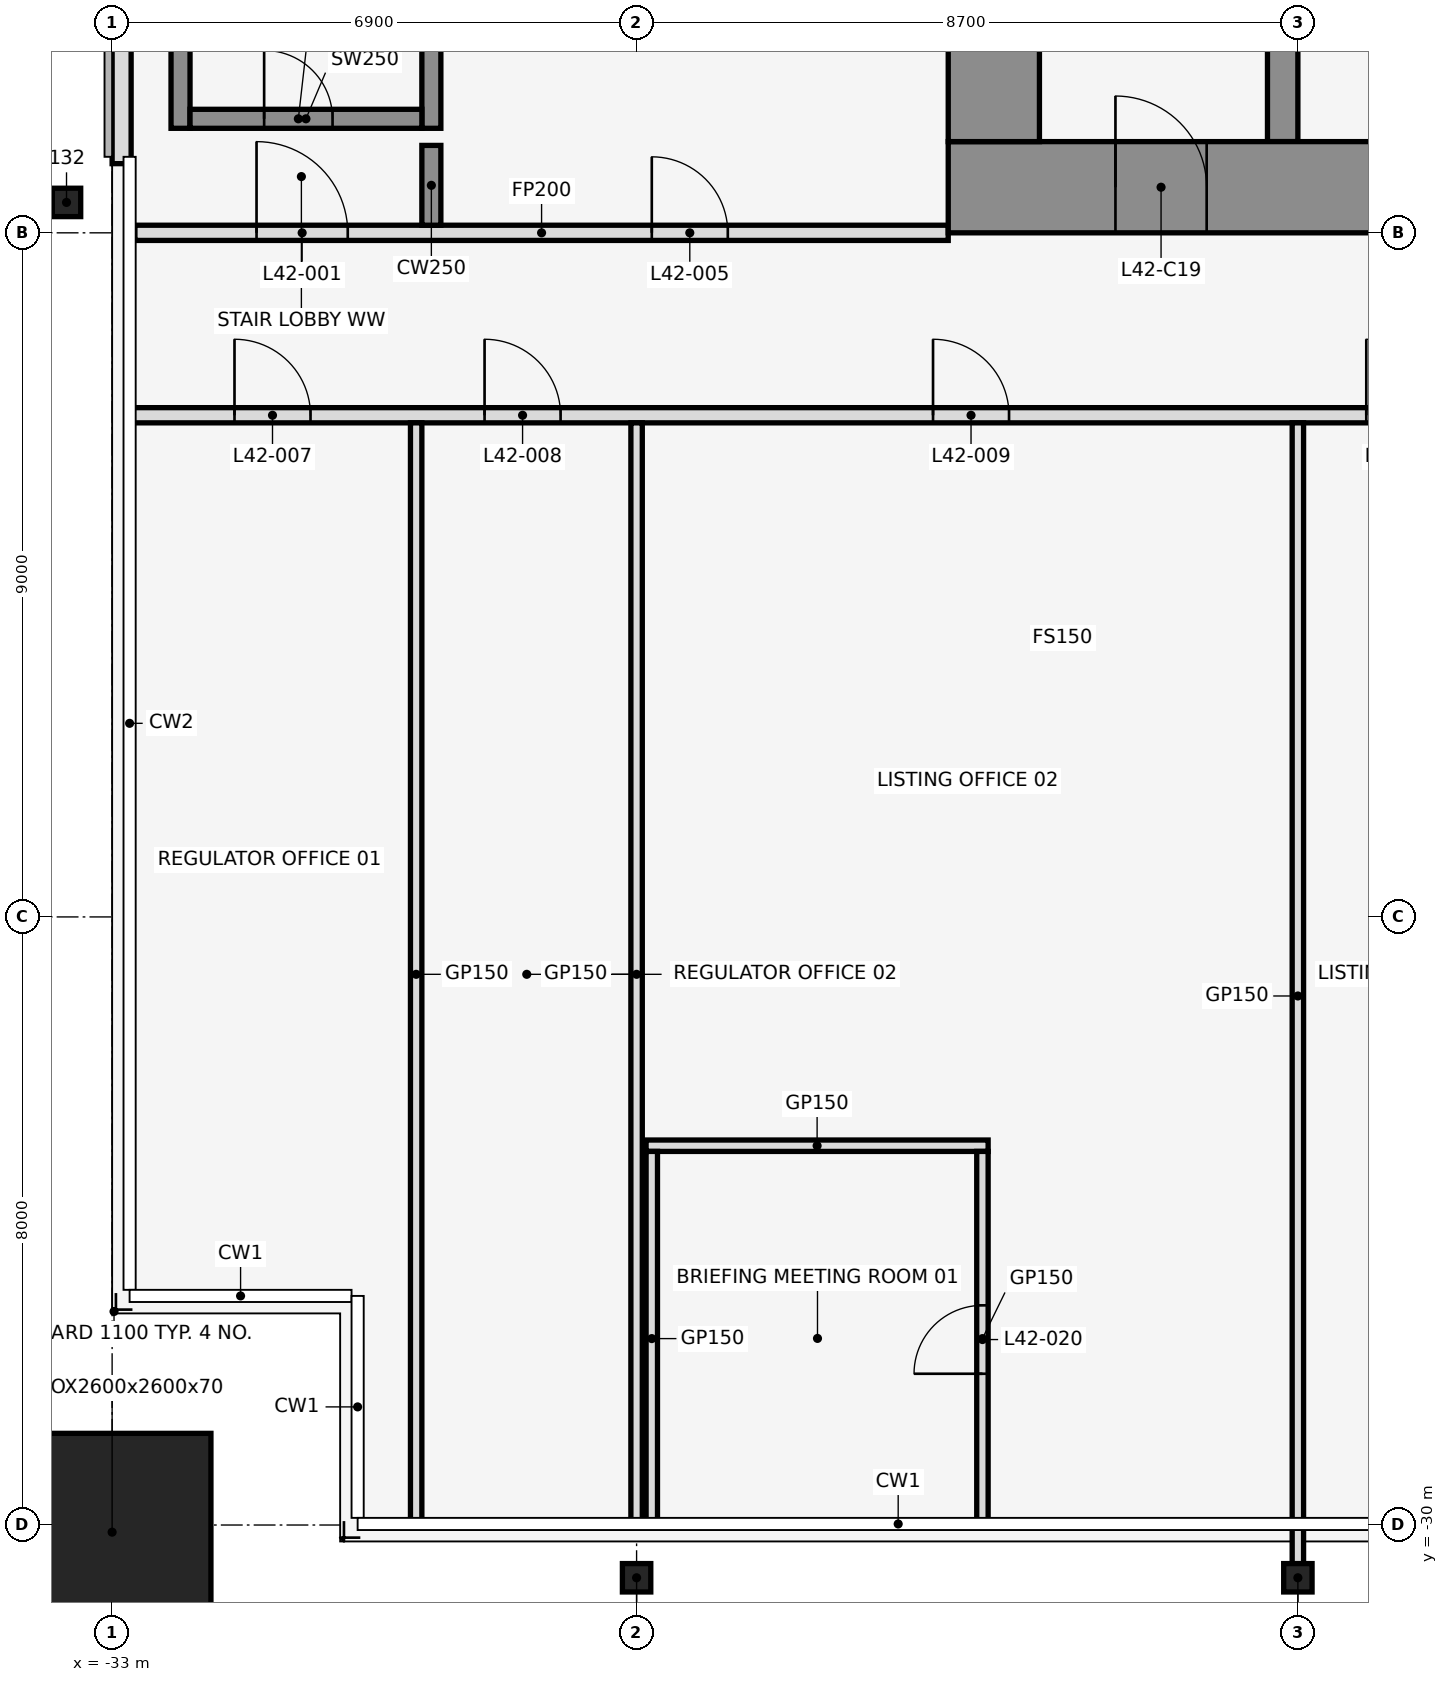
"""IFC4 building model, lengths in metres.
Left out: names, types, materials, properties, quantities, classifications, styles, units other than length and angle.
Written with IfcOpenShell. Run it as: python <this file> out.ifc"""

import sys

from ifc_helpers import new_model, si_unit, direction, frame, frame_2d, origin, origin_2d, place, context, subcontext, project, spatial, rectangle, hollow_rectangle, i_section, extrude, element, fill, save


model = new_model("IFC4")
c1 = context("Model", 3, precision=1e-05, world=origin(), true_north=direction((0.0, 1.0)))
c2 = subcontext(c1, "Body", "Model", "MODEL_VIEW")
j1 = project(units=[si_unit("LENGTHUNIT", "METRE"), si_unit("PLANEANGLEUNIT", "RADIAN")], contexts=[c1])
p1 = place(None, origin())
s1 = spatial("IfcSite", under=j1, at=p1, CompositionType="ELEMENT")
p2 = place(p1, origin())
s2 = spatial("IfcBuilding", under=s1, at=p2, CompositionType="ELEMENT")
p3 = place(p2, frame((0.0, 0.0, 190.9)))
s3 = spatial("IfcBuildingStorey", under=s2, at=p3, CompositionType="ELEMENT", Elevation=190.9)
p4 = place(p3, frame((-33.0, -30.094, 0.0), z_axis=(0.0, 0.0, 1.0), x_axis=(1.0, 0.0, 0.0)))
e1 = element("IfcColumn", 1, at=p4, inside=s3, PredefinedType="COLUMN", context=c2, shape_type="SweptSolid", body=[
    extrude(hollow_rectangle(XDim=2.6, YDim=2.6, WallThickness=0.07, at=origin_2d()), origin(), (0.0, 0.0, 1.0), 4.1),
])
for number, where, z_axis, x_axis in (
    (2, (-26.1, -30.694, 0.0), (0.0, 0.0, 1.0), (1.0, 0.0, 0.0)),
    (3, (-17.4, -30.694, 0.0), (0.0, 0.0, 1.0), (1.0, 0.0, 0.0)),
    (4, (-33.6, -12.6, 0.0), (0.0, 0.0, 1.0), (1.0, 0.0, 0.0)),
):
    element("IfcColumn", number, at=place(p3, frame(where, z_axis=z_axis, x_axis=x_axis)), inside=s3, PredefinedType="COLUMN", context=c2, shape_type="SweptSolid", body=[
        extrude(i_section(OverallWidth=0.373, OverallDepth=0.373, WebThickness=0.016, FlangeThickness=0.026, at=origin_2d()), origin(), (0.0, 0.0, 1.0), 4.1),
    ])
p5 = place(p3, frame((-32.875, -6.0, 0.0), z_axis=(0.0, 0.0, 1.0), x_axis=(0.0, -1.0, 0.0)))
e5 = element("IfcWall", 5, at=p5, inside=s3, PredefinedType="STANDARD", context=c2, shape_type="SweptSolid", body=[
    extrude(rectangle(XDim=6.09, YDim=0.25, at=frame_2d((3.045, 0.0))), origin(), (0.0, 0.0, 1.0), 3.95),
])
p6 = place(p3, frame((-32.1, -11.625, 0.0), z_axis=(0.0, 0.0, 1.0), x_axis=(0.0, 1.0, 0.0)))
e6 = element("IfcWall", 6, at=p6, inside=s3, PredefinedType="SHEAR", context=c2, shape_type="SweptSolid", body=[
    extrude(rectangle(XDim=7.325, YDim=0.25, at=frame_2d((3.663, 0.0))), origin(), (0.0, 0.0, 1.0), 4.1),
])
p7 = place(p3, frame((-28.8, -11.625, 0.0), z_axis=(0.0, 0.0, 1.0), x_axis=(0.0, 1.0, 0.0)))
e7 = element("IfcWall", 7, at=p7, inside=s3, PredefinedType="SHEAR", context=c2, shape_type="SweptSolid", body=[
    extrude(rectangle(XDim=7.25, YDim=0.25, at=frame_2d((3.625, 0.0))), origin(), (0.0, 0.0, 1.0), 4.1),
])
p8 = place(p3, frame((-31.975, -11.5, 0.0), z_axis=(0.0, 0.0, 1.0), x_axis=(1.0, 0.0, 0.0)))
e8 = element("IfcWall", 8, at=p8, inside=s3, PredefinedType="SHEAR", context=c2, shape_type="SweptSolid", body=[
    extrude(rectangle(XDim=3.05, YDim=0.25, at=frame_2d((1.525, 0.0))), origin(), (0.0, 0.0, 1.0), 4.1),
])
p9 = place(p8, frame((0.975, 0.0, 0.0)))
e9 = element("IfcOpeningElement", 9, at=p9, cuts=e8, PredefinedType="OPENING", context=c2, shape_type="SweptSolid", body=[
    extrude(rectangle(XDim=0.9, YDim=2.1, at=frame_2d((0.45, 1.05))), frame((0.0, 0.137, 0.0), z_axis=(0.0, -1.0, 0.0), x_axis=(1.0, 0.0, 0.0)), (0.0, 0.0, 1.0), 0.274),
])
p10 = place(p3, frame((-25.975, -25.01, 0.0), z_axis=(0.0, 0.0, 1.0), x_axis=(1.0, 0.0, 0.0)))
e10 = element("IfcWall", 10, at=p10, inside=s3, PredefinedType="PARTITIONING", context=c2, shape_type="SweptSolid", body=[
    extrude(rectangle(XDim=4.5, YDim=0.15, at=frame_2d((2.25, 0.0))), origin(), (0.0, 0.0, 1.0), 2.96),
])
p11 = place(p3, frame((-32.79, -15.4, 0.0), z_axis=(0.0, 0.0, 1.0), x_axis=(1.0, 0.0, 0.0)))
e11 = element("IfcWall", 11, at=p11, inside=s3, PredefinedType="PARTITIONING", context=c2, shape_type="SweptSolid", body=[
    extrude(rectangle(XDim=65.58, YDim=0.2, at=frame_2d((32.79, 0.0))), origin(), (0.0, 0.0, 1.0), 2.96),
])
p12 = place(p11, frame((1.4, 0.0, 0.0)))
e12 = element("IfcOpeningElement", 12, at=p12, cuts=e11, PredefinedType="OPENING", context=c2, shape_type="SweptSolid", body=[
    extrude(rectangle(XDim=1.0, YDim=2.1, at=frame_2d((0.5, 1.05))), frame((0.0, 0.112, 0.0), z_axis=(0.0, -1.0, 0.0), x_axis=(1.0, 0.0, 0.0)), (0.0, 0.0, 1.0), 0.224),
])
p13 = place(p11, frame((4.69, 0.0, 0.0)))
e13 = element("IfcOpeningElement", 13, at=p13, cuts=e11, PredefinedType="OPENING", context=c2, shape_type="SweptSolid", body=[
    extrude(rectangle(XDim=1.0, YDim=2.1, at=frame_2d((0.5, 1.05))), frame((0.0, 0.112, 0.0), z_axis=(0.0, -1.0, 0.0), x_axis=(1.0, 0.0, 0.0)), (0.0, 0.0, 1.0), 0.224),
])
p14 = place(p11, frame((10.59, 0.0, 0.0)))
e14 = element("IfcOpeningElement", 14, at=p14, cuts=e11, PredefinedType="OPENING", context=c2, shape_type="SweptSolid", body=[
    extrude(rectangle(XDim=1.0, YDim=2.1, at=frame_2d((0.5, 1.05))), frame((0.0, 0.112, 0.0), z_axis=(0.0, -1.0, 0.0), x_axis=(1.0, 0.0, 0.0)), (0.0, 0.0, 1.0), 0.224),
])
p15 = place(p11, frame((16.29, 0.0, 0.0)))
e15 = element("IfcOpeningElement", 15, at=p15, cuts=e11, PredefinedType="OPENING", context=c2, shape_type="SweptSolid", body=[
    extrude(rectangle(XDim=1.0, YDim=2.1, at=frame_2d((0.5, 1.05))), frame((0.0, 0.112, 0.0), z_axis=(0.0, -1.0, 0.0), x_axis=(1.0, 0.0, 0.0)), (0.0, 0.0, 1.0), 0.224),
])
p16 = place(p11, frame((23.19, 0.0, 0.0)))
e16 = element("IfcOpeningElement", 16, at=p16, cuts=e11, PredefinedType="OPENING", context=c2, shape_type="SweptSolid", body=[
    extrude(rectangle(XDim=1.8, YDim=2.1, at=frame_2d((0.9, 1.05))), frame((0.0, 0.112, 0.0), z_axis=(0.0, -1.0, 0.0), x_axis=(1.0, 0.0, 0.0)), (0.0, 0.0, 1.0), 0.224),
])
p17 = place(p11, frame((33.29, 0.0, 0.0)))
e17 = element("IfcOpeningElement", 17, at=p17, cuts=e11, PredefinedType="OPENING", context=c2, shape_type="SweptSolid", body=[
    extrude(rectangle(XDim=1.8, YDim=2.1, at=frame_2d((0.9, 1.05))), frame((0.0, 0.112, 0.0), z_axis=(0.0, -1.0, 0.0), x_axis=(1.0, 0.0, 0.0)), (0.0, 0.0, 1.0), 0.224),
])
p18 = place(p11, frame((40.99, 0.0, 0.0)))
e18 = element("IfcOpeningElement", 18, at=p18, cuts=e11, PredefinedType="OPENING", context=c2, shape_type="SweptSolid", body=[
    extrude(rectangle(XDim=1.0, YDim=2.1, at=frame_2d((0.5, 1.05))), frame((0.0, 0.112, 0.0), z_axis=(0.0, -1.0, 0.0), x_axis=(1.0, 0.0, 0.0)), (0.0, 0.0, 1.0), 0.224),
])
p19 = place(p11, frame((48.29, 0.0, 0.0)))
e19 = element("IfcOpeningElement", 19, at=p19, cuts=e11, PredefinedType="OPENING", context=c2, shape_type="SweptSolid", body=[
    extrude(rectangle(XDim=0.9, YDim=2.1, at=frame_2d((0.45, 1.05))), frame((0.0, 0.112, 0.0), z_axis=(0.0, -1.0, 0.0), x_axis=(1.0, 0.0, 0.0)), (0.0, 0.0, 1.0), 0.224),
])
p20 = place(p11, frame((55.09, 0.0, 0.0)))
e20 = element("IfcOpeningElement", 20, at=p20, cuts=e11, PredefinedType="OPENING", context=c2, shape_type="SweptSolid", body=[
    extrude(rectangle(XDim=1.8, YDim=2.1, at=frame_2d((0.9, 1.05))), frame((0.0, 0.112, 0.0), z_axis=(0.0, -1.0, 0.0), x_axis=(1.0, 0.0, 0.0)), (0.0, 0.0, 1.0), 0.224),
])
p21 = place(p11, frame((61.69, 0.0, 0.0)))
e21 = element("IfcOpeningElement", 21, at=p21, cuts=e11, PredefinedType="OPENING", context=c2, shape_type="SweptSolid", body=[
    extrude(rectangle(XDim=1.0, YDim=2.1, at=frame_2d((0.5, 1.05))), frame((0.0, 0.112, 0.0), z_axis=(0.0, -1.0, 0.0), x_axis=(1.0, 0.0, 0.0)), (0.0, 0.0, 1.0), 0.224),
])
p22 = place(p3, frame((-32.7, -13.0, 0.0), z_axis=(0.0, 0.0, 1.0), x_axis=(1.0, 0.0, 0.0)))
e22 = element("IfcWall", 22, at=p22, inside=s3, PredefinedType="PARTITIONING", context=c2, shape_type="SweptSolid", body=[
    extrude(rectangle(XDim=10.7, YDim=0.2, at=frame_2d((5.35, 0.0))), origin(), (0.0, 0.0, 1.0), 2.96),
])
p23 = place(p22, frame((1.6, 0.0, 0.0)))
e23 = element("IfcOpeningElement", 23, at=p23, cuts=e22, PredefinedType="OPENING", context=c2, shape_type="SweptSolid", body=[
    extrude(rectangle(XDim=1.2, YDim=2.1, at=frame_2d((0.6, 1.05))), frame((0.0, 0.112, 0.0), z_axis=(0.0, -1.0, 0.0), x_axis=(1.0, 0.0, 0.0)), (0.0, 0.0, 1.0), 0.224),
])
p24 = place(p22, frame((6.8, 0.0, 0.0)))
e24 = element("IfcOpeningElement", 24, at=p24, cuts=e22, PredefinedType="OPENING", context=c2, shape_type="SweptSolid", body=[
    extrude(rectangle(XDim=1.0, YDim=2.1, at=frame_2d((0.5, 1.05))), frame((0.0, 0.112, 0.0), z_axis=(0.0, -1.0, 0.0), x_axis=(1.0, 0.0, 0.0)), (0.0, 0.0, 1.0), 0.224),
])
p25 = place(p3, frame((-29.0, -30.01, 0.0), z_axis=(0.0, 0.0, 1.0), x_axis=(0.0, 1.0, 0.0)))
e25 = element("IfcWall", 25, at=p25, inside=s3, PredefinedType="PARTITIONING", context=c2, shape_type="SweptSolid", body=[
    extrude(rectangle(XDim=14.51, YDim=0.15, at=frame_2d((7.255, 0.0))), origin(), (0.0, 0.0, 1.0), 2.96),
])
p26 = place(p3, frame((-28.8, -12.9, 0.0), z_axis=(0.0, 0.0, 1.0), x_axis=(0.0, 1.0, 0.0)))
e26 = element("IfcWall", 26, at=p26, inside=s3, PredefinedType="SHEAR", context=c2, shape_type="SweptSolid", body=[
    extrude(rectangle(XDim=1.05, YDim=0.25, at=frame_2d((0.525, 0.0))), origin(), (0.0, 0.0, 1.0), 4.1),
])
p27 = place(p3, frame((-26.1, -30.01, 0.0), z_axis=(0.0, 0.0, 1.0), x_axis=(0.0, 1.0, 0.0)))
e27 = element("IfcWall", 27, at=p27, inside=s3, PredefinedType="PARTITIONING", context=c2, shape_type="SweptSolid", body=[
    extrude(rectangle(XDim=14.51, YDim=0.15, at=frame_2d((7.255, 0.0))), origin(), (0.0, 0.0, 1.0), 2.96),
])
p28 = place(p3, frame((-25.9, -30.01, 0.0), z_axis=(0.0, 0.0, 1.0), x_axis=(0.0, 1.0, 0.0)))
e28 = element("IfcWall", 28, at=p28, inside=s3, PredefinedType="PARTITIONING", context=c2, shape_type="SweptSolid", body=[
    extrude(rectangle(XDim=4.925, YDim=0.15, at=frame_2d((2.462, 0.0))), origin(), (0.0, 0.0, 1.0), 2.96),
])
p29 = place(p3, frame((-21.55, -30.01, 0.0), z_axis=(0.0, 0.0, 1.0), x_axis=(0.0, 1.0, 0.0)))
e29 = element("IfcWall", 29, at=p29, inside=s3, PredefinedType="PARTITIONING", context=c2, shape_type="SweptSolid", body=[
    extrude(rectangle(XDim=4.925, YDim=0.15, at=frame_2d((2.462, 0.0))), origin(), (0.0, 0.0, 1.0), 2.96),
])
p30 = place(p29, frame((2.0, 0.0, 0.0)))
e30 = element("IfcOpeningElement", 30, at=p30, cuts=e29, PredefinedType="OPENING", context=c2, shape_type="SweptSolid", body=[
    extrude(rectangle(XDim=0.9, YDim=2.1, at=frame_2d((0.45, 1.05))), frame((0.0, 0.087, 0.0), z_axis=(0.0, -1.0, 0.0), x_axis=(1.0, 0.0, 0.0)), (0.0, 0.0, 1.0), 0.174),
])
p31 = place(p3, frame((-17.4, -30.58, 0.0), z_axis=(0.0, 0.0, 1.0), x_axis=(0.0, 1.0, 0.0)))
e31 = element("IfcWall", 31, at=p31, inside=s3, PredefinedType="PARTITIONING", context=c2, shape_type="SweptSolid", body=[
    extrude(rectangle(XDim=15.08, YDim=0.15, at=frame_2d((7.54, 0.0))), origin(), (0.0, 0.0, 1.0), 2.96),
])
p32 = place(p3, frame((-17.6, -11.8, 0.0), z_axis=(0.0, 0.0, 1.0), x_axis=(0.0, 1.0, 0.0)))
e32 = element("IfcWall", 32, at=p32, inside=s3, PredefinedType="SHEAR", context=c2, shape_type="SweptSolid", body=[
    extrude(rectangle(XDim=10.6, YDim=0.4, at=frame_2d((5.3, 0.0))), origin(), (0.0, 0.0, 1.0), 4.1),
])
p33 = place(p32, frame((1.25, 0.0, 0.0)))
e33 = element("IfcOpeningElement", 33, at=p33, cuts=e32, PredefinedType="OPENING", context=c2, shape_type="SweptSolid", body=[
    extrude(rectangle(XDim=1.1, YDim=2.1, at=frame_2d((0.55, 1.05))), frame((0.0, 0.212, 0.0), z_axis=(0.0, -1.0, 0.0), x_axis=(1.0, 0.0, 0.0)), (0.0, 0.0, 1.0), 0.424),
])
p34 = place(p32, frame((3.95, 0.0, 0.0)))
e34 = element("IfcOpeningElement", 34, at=p34, cuts=e32, PredefinedType="OPENING", context=c2, shape_type="SweptSolid", body=[
    extrude(rectangle(XDim=1.1, YDim=2.1, at=frame_2d((0.55, 1.05))), frame((0.0, 0.212, 0.0), z_axis=(0.0, -1.0, 0.0), x_axis=(1.0, 0.0, 0.0)), (0.0, 0.0, 1.0), 0.424),
])
p35 = place(p3, frame((-22.0, -12.4, 0.0), z_axis=(0.0, 0.0, 1.0), x_axis=(1.0, 0.0, 0.0)))
e35 = element("IfcWall", 35, at=p35, inside=s3, PredefinedType="SHEAR", context=c2, shape_type="SweptSolid", body=[
    extrude(rectangle(XDim=44.0, YDim=1.2, at=frame_2d((22.0, 0.0))), origin(), (0.0, 0.0, 1.0), 4.1),
])
p36 = place(p35, frame((2.2, 0.0, 0.0)))
e36 = element("IfcOpeningElement", 36, at=p36, cuts=e35, PredefinedType="OPENING", context=c2, shape_type="SweptSolid", body=[
    extrude(rectangle(XDim=1.2, YDim=2.1, at=frame_2d((0.6, 1.05))), frame((0.0, 0.612, 0.0), z_axis=(0.0, -1.0, 0.0), x_axis=(1.0, 0.0, 0.0)), (0.0, 0.0, 1.0), 1.224),
])
p37 = place(p35, frame((21.4, 0.0, 0.0)))
e37 = element("IfcOpeningElement", 37, at=p37, cuts=e35, PredefinedType="OPENING", context=c2, shape_type="SweptSolid", body=[
    extrude(rectangle(XDim=1.2, YDim=2.1, at=frame_2d((0.6, 1.05))), frame((0.0, 0.612, 0.0), z_axis=(0.0, -1.0, 0.0), x_axis=(1.0, 0.0, 0.0)), (0.0, 0.0, 1.0), 1.224),
])
p38 = place(p35, frame((40.6, 0.0, 0.0)))
e38 = element("IfcOpeningElement", 38, at=p38, cuts=e35, PredefinedType="OPENING", context=c2, shape_type="SweptSolid", body=[
    extrude(rectangle(XDim=1.2, YDim=2.1, at=frame_2d((0.6, 1.05))), frame((0.0, 0.612, 0.0), z_axis=(0.0, -1.0, 0.0), x_axis=(1.0, 0.0, 0.0)), (0.0, 0.0, 1.0), 1.224),
])
p39 = place(p35, frame((16.0, 0.0, 0.0)))
e39 = element("IfcOpeningElement", 39, at=p39, cuts=e35, PredefinedType="OPENING", context=c2, shape_type="SweptSolid", body=[
    extrude(rectangle(XDim=1.8, YDim=2.1, at=frame_2d((0.9, 1.05))), frame((0.0, 0.612, 0.0), z_axis=(0.0, -1.0, 0.0), x_axis=(1.0, 0.0, 0.0)), (0.0, 0.0, 1.0), 1.224),
])
p40 = place(p35, frame((6.3, 0.0, 0.0)))
e40 = element("IfcOpeningElement", 40, at=p40, cuts=e35, PredefinedType="OPENING", context=c2, shape_type="SweptSolid", body=[
    extrude(rectangle(XDim=1.2, YDim=2.1, at=frame_2d((0.6, 1.05))), frame((0.0, 0.612, 0.0), z_axis=(0.0, -1.0, 0.0), x_axis=(1.0, 0.0, 0.0)), (0.0, 0.0, 1.0), 1.224),
])
p41 = place(p35, frame((26.2, 0.0, 0.0)))
e41 = element("IfcOpeningElement", 41, at=p41, cuts=e35, PredefinedType="OPENING", context=c2, shape_type="SweptSolid", body=[
    extrude(rectangle(XDim=1.8, YDim=2.1, at=frame_2d((0.9, 1.05))), frame((0.0, 0.612, 0.0), z_axis=(0.0, -1.0, 0.0), x_axis=(1.0, 0.0, 0.0)), (0.0, 0.0, 1.0), 1.224),
])
p42 = place(p35, frame((36.5, 0.0, 0.0)))
e42 = element("IfcOpeningElement", 42, at=p42, cuts=e35, PredefinedType="OPENING", context=c2, shape_type="SweptSolid", body=[
    extrude(rectangle(XDim=1.2, YDim=2.1, at=frame_2d((0.6, 1.05))), frame((0.0, 0.612, 0.0), z_axis=(0.0, -1.0, 0.0), x_axis=(1.0, 0.0, 0.0)), (0.0, 0.0, 1.0), 1.224),
])
p43 = place(p3, frame((-21.4, -11.8, 0.0), z_axis=(0.0, 0.0, 1.0), x_axis=(0.0, 1.0, 0.0)))
e43 = element("IfcWall", 43, at=p43, inside=s3, PredefinedType="SHEAR", context=c2, shape_type="SweptSolid", body=[
    extrude(rectangle(XDim=10.6, YDim=1.2, at=frame_2d((5.3, 0.0))), origin(), (0.0, 0.0, 1.0), 4.1),
])
p44 = place(p23, origin())
e44 = element("IfcDoor", 44, at=p44, inside=s3, OperationType="SINGLE_SWING_LEFT", PredefinedType="DOOR", context=c2, shape_type="SweptSolid", body=[
    extrude(rectangle(XDim=1.2, YDim=2.1, at=frame_2d((0.6, 1.05))), frame((0.0, 0.025, 0.0), z_axis=(0.0, -1.0, 0.0), x_axis=(1.0, 0.0, 0.0)), (0.0, 0.0, 1.0), 0.05),
])
fill(e23, e44)
p45 = place(p9, origin())
e45 = element("IfcDoor", 45, at=p45, inside=s3, OperationType="SINGLE_SWING_LEFT", PredefinedType="DOOR", context=c2, shape_type="SweptSolid", body=[
    extrude(rectangle(XDim=0.9, YDim=2.1, at=frame_2d((0.45, 1.05))), frame((0.0, 0.025, 0.0), z_axis=(0.0, -1.0, 0.0), x_axis=(1.0, 0.0, 0.0)), (0.0, 0.0, 1.0), 0.05),
])
fill(e9, e45)
p46 = place(p24, origin())
e46 = element("IfcDoor", 46, at=p46, inside=s3, OperationType="SINGLE_SWING_LEFT", PredefinedType="DOOR", context=c2, shape_type="SweptSolid", body=[
    extrude(rectangle(XDim=1.0, YDim=2.1, at=frame_2d((0.5, 1.05))), frame((0.0, 0.025, 0.0), z_axis=(0.0, -1.0, 0.0), x_axis=(1.0, 0.0, 0.0)), (0.0, 0.0, 1.0), 0.05),
])
fill(e24, e46)
p47 = place(p12, frame((1.0, 0.0, 0.0), z_axis=(0.0, 0.0, 1.0), x_axis=(-1.0, 0.0, 0.0)))
e47 = element("IfcDoor", 47, at=p47, inside=s3, OperationType="SINGLE_SWING_LEFT", PredefinedType="DOOR", context=c2, shape_type="SweptSolid", body=[
    extrude(rectangle(XDim=1.0, YDim=2.1, at=frame_2d((0.5, 1.05))), frame((0.0, 0.025, 0.0), z_axis=(0.0, -1.0, 0.0), x_axis=(1.0, 0.0, 0.0)), (0.0, 0.0, 1.0), 0.05),
])
fill(e12, e47)
p48 = place(p13, frame((1.0, 0.0, 0.0), z_axis=(0.0, 0.0, 1.0), x_axis=(-1.0, 0.0, 0.0)))
e48 = element("IfcDoor", 48, at=p48, inside=s3, OperationType="SINGLE_SWING_RIGHT", PredefinedType="DOOR", context=c2, shape_type="SweptSolid", body=[
    extrude(rectangle(XDim=1.0, YDim=2.1, at=frame_2d((0.5, 1.05))), frame((0.0, 0.025, 0.0), z_axis=(0.0, -1.0, 0.0), x_axis=(1.0, 0.0, 0.0)), (0.0, 0.0, 1.0), 0.05),
])
fill(e13, e48)
p49 = place(p14, frame((1.0, 0.0, 0.0), z_axis=(0.0, 0.0, 1.0), x_axis=(-1.0, 0.0, 0.0)))
e49 = element("IfcDoor", 49, at=p49, inside=s3, OperationType="SINGLE_SWING_RIGHT", PredefinedType="DOOR", context=c2, shape_type="SweptSolid", body=[
    extrude(rectangle(XDim=1.0, YDim=2.1, at=frame_2d((0.5, 1.05))), frame((0.0, 0.025, 0.0), z_axis=(0.0, -1.0, 0.0), x_axis=(1.0, 0.0, 0.0)), (0.0, 0.0, 1.0), 0.05),
])
fill(e14, e49)
p50 = place(p15, frame((1.0, 0.0, 0.0), z_axis=(0.0, 0.0, 1.0), x_axis=(-1.0, 0.0, 0.0)))
e50 = element("IfcDoor", 50, at=p50, inside=s3, OperationType="SINGLE_SWING_LEFT", PredefinedType="DOOR", context=c2, shape_type="SweptSolid", body=[
    extrude(rectangle(XDim=1.0, YDim=2.1, at=frame_2d((0.5, 1.05))), frame((0.0, 0.025, 0.0), z_axis=(0.0, -1.0, 0.0), x_axis=(1.0, 0.0, 0.0)), (0.0, 0.0, 1.0), 0.05),
])
fill(e15, e50)
p51 = place(p30, origin())
e51 = element("IfcDoor", 51, at=p51, inside=s3, OperationType="SINGLE_SWING_LEFT", PredefinedType="DOOR", context=c2, shape_type="SweptSolid", body=[
    extrude(rectangle(XDim=0.9, YDim=2.1, at=frame_2d((0.45, 1.05))), frame((0.0, 0.025, 0.0), z_axis=(0.0, -1.0, 0.0), x_axis=(1.0, 0.0, 0.0)), (0.0, 0.0, 1.0), 0.05),
])
fill(e30, e51)
p52 = place(p36, frame((1.2, 0.0, 0.0), z_axis=(0.0, 0.0, 1.0), x_axis=(-1.0, 0.0, 0.0)))
e52 = element("IfcDoor", 52, at=p52, inside=s3, OperationType="SINGLE_SWING_RIGHT", PredefinedType="DOOR", context=c2, shape_type="SweptSolid", body=[
    extrude(rectangle(XDim=1.2, YDim=2.1, at=frame_2d((0.6, 1.05))), frame((0.0, 0.025, 0.0), z_axis=(0.0, -1.0, 0.0), x_axis=(1.0, 0.0, 0.0)), (0.0, 0.0, 1.0), 0.05),
])
fill(e36, e52)
save(model, sys.argv[1])
